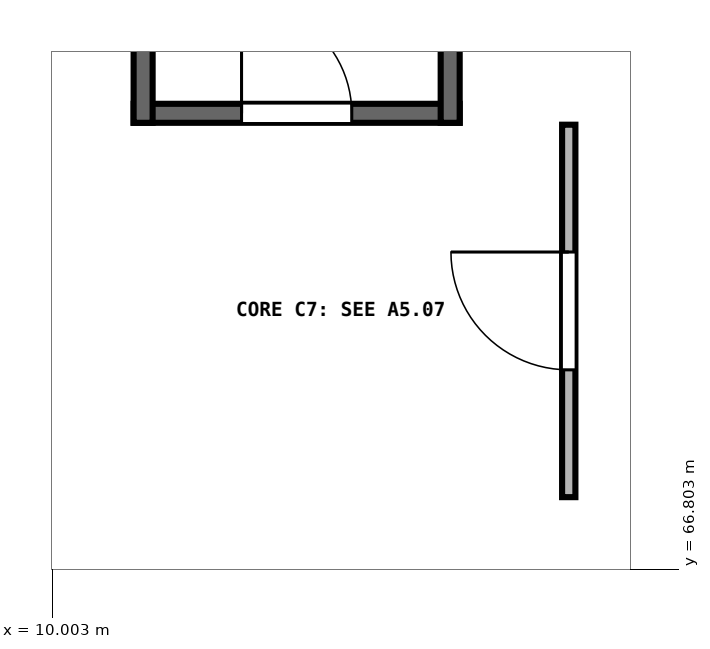
"""IFC4 building model, lengths in metres.
Left out: names, types, materials, properties, quantities, classifications, styles, units other than length and angle.
Written with IfcOpenShell. Run it as: python <this file> out.ifc"""

import sys

from ifc_helpers import new_model, si_unit, direction, frame, frame_2d, origin, place, context, subcontext, project, spatial, rectangle, extrude, element, fill, save


model = new_model("IFC4")
c1 = context("Model", 3, precision=1e-05, world=origin(), true_north=direction((0.0, 1.0)))
c2 = subcontext(c1, "Body", "Model", "MODEL_VIEW")
j1 = project(units=[si_unit("LENGTHUNIT", "METRE"), si_unit("PLANEANGLEUNIT", "RADIAN")], contexts=[c1])
p1 = place(None, origin())
s1 = spatial("IfcSite", under=j1, at=p1, CompositionType="ELEMENT")
p2 = place(p1, origin())
s2 = spatial("IfcBuilding", under=s1, at=p2, CompositionType="ELEMENT")
p3 = place(p2, frame((0.0, 0.0, -4.8)))
s3 = spatial("IfcBuildingStorey", under=s2, at=p3, CompositionType="ELEMENT", Elevation=-4.8)
p4 = place(p3, frame((11.075, 72.8, 0.0), z_axis=(0.0, 0.0, 1.0), x_axis=(1.0, 0.0, 0.0)))
e1 = element("IfcWall", 1, at=p4, inside=s3, PredefinedType="SHEAR", context=c2, shape_type="SweptSolid", body=[
    extrude(rectangle(XDim=4.29, YDim=0.25, at=frame_2d((2.145, 0.0))), origin(), (0.0, 0.0, 1.0), 4.5),
])
p5 = place(p4, frame((1.42, 0.0, 0.0)))
e2 = element("IfcOpeningElement", 2, at=p5, cuts=e1, PredefinedType="OPENING", context=c2, shape_type="SweptSolid", body=[
    extrude(rectangle(XDim=1.45, YDim=2.2, at=frame_2d((0.725, 1.1))), frame((0.0, 0.135, 0.0), z_axis=(0.0, -1.0, 0.0), x_axis=(1.0, 0.0, 0.0)), (0.0, 0.0, 1.0), 0.27),
])
for number, where, z_axis, x_axis in (
    (3, (11.2, 72.675, 0.0), (0.0, 0.0, 1.0), (0.0, 1.0, 0.0)),
    (4, (15.24, 72.675, 0.0), (0.0, 0.0, 1.0), (0.0, 1.0, 0.0)),
):
    element("IfcWall", number, at=place(p3, frame(where, z_axis=z_axis, x_axis=x_axis)), inside=s3, PredefinedType="SHEAR", context=c2, shape_type="SweptSolid", body=[
        extrude(rectangle(XDim=11.09, YDim=0.25, at=frame_2d((5.545, 0.0))), origin(), (0.0, 0.0, 1.0), 4.5),
    ])
p6 = place(p3, frame((16.8, 67.75, 0.0), z_axis=(0.0, 0.0, 1.0), x_axis=(0.0, 1.0, 0.0)))
e5 = element("IfcWall", 5, at=p6, inside=s3, PredefinedType="PARTITIONING", context=c2, shape_type="SweptSolid", body=[
    extrude(rectangle(XDim=4.9, YDim=0.175, at=frame_2d((2.45, 0.0))), origin(), (0.0, 0.0, 1.0), 4.45),
])
p7 = place(p6, frame((1.675, 0.0, 0.0)))
e6 = element("IfcOpeningElement", 6, at=p7, cuts=e5, PredefinedType="OPENING", context=c2, shape_type="SweptSolid", body=[
    extrude(rectangle(XDim=1.55, YDim=2.22, at=frame_2d((0.775, 1.11))), frame((0.0, 0.097, 0.0), z_axis=(0.0, -1.0, 0.0), x_axis=(1.0, 0.0, 0.0)), (0.0, 0.0, 1.0), 0.195),
])
p8 = place(p5, origin())
e7 = element("IfcDoor", 7, at=p8, inside=s3, OperationType="SINGLE_SWING_LEFT", PredefinedType="DOOR", context=c2, shape_type="SweptSolid", body=[
    extrude(rectangle(XDim=1.45, YDim=2.2, at=frame_2d((0.725, 1.1))), frame((0.0, 0.025, 0.0), z_axis=(0.0, -1.0, 0.0), x_axis=(1.0, 0.0, 0.0)), (0.0, 0.0, 1.0), 0.05),
])
fill(e2, e7)
p9 = place(p7, origin())
e8 = element("IfcDoor", 8, at=p9, inside=s3, OperationType="SINGLE_SWING_RIGHT", PredefinedType="DOOR", context=c2, shape_type="SweptSolid", body=[
    extrude(rectangle(XDim=1.55, YDim=2.22, at=frame_2d((0.775, 1.11))), frame((0.0, 0.025, 0.0), z_axis=(0.0, -1.0, 0.0), x_axis=(1.0, 0.0, 0.0)), (0.0, 0.0, 1.0), 0.05),
])
fill(e6, e8)
save(model, sys.argv[1])
